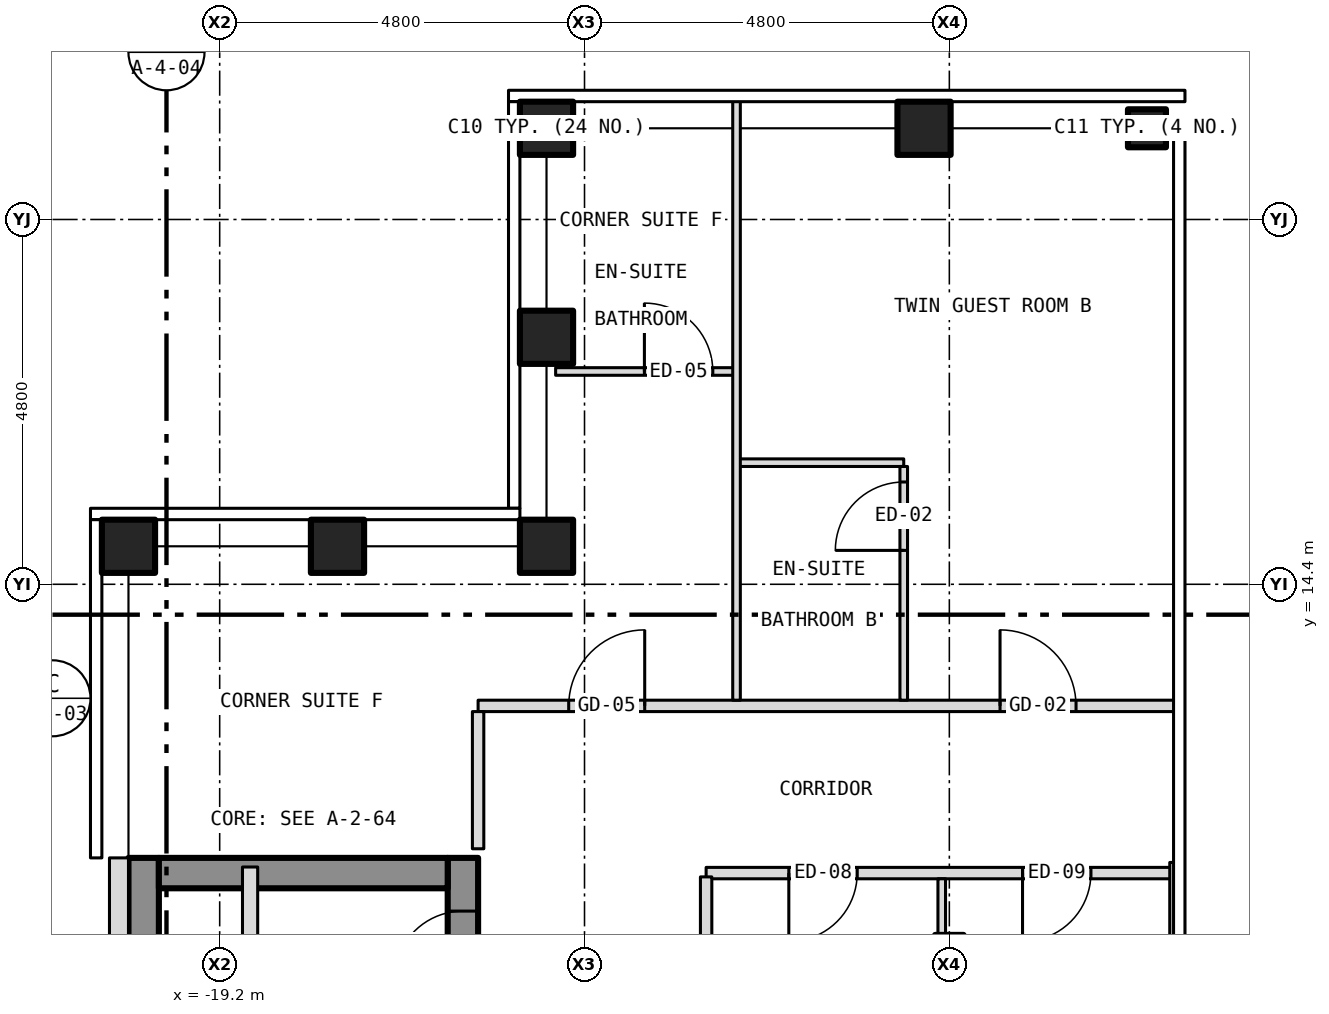
"""IFC4 building model, lengths in metres.
Left out: names, types, materials, properties, quantities, classifications, styles, units other than length and angle.
Written with IfcOpenShell. Run it as: python <this file> out.ifc"""

import sys

from ifc_helpers import new_model, si_unit, direction, frame, frame_2d, origin, origin_2d, place, context, subcontext, project, spatial, rectangle, hollow_rectangle, extrude, element, fill, save


model = new_model("IFC4")
c1 = context("Model", 3, precision=1e-05, world=origin(), true_north=direction((0.0, 1.0)))
c2 = subcontext(c1, "Body", "Model", "MODEL_VIEW")
j1 = project(units=[si_unit("LENGTHUNIT", "METRE"), si_unit("PLANEANGLEUNIT", "RADIAN")], contexts=[c1])
p1 = place(None, origin())
s1 = spatial("IfcSite", under=j1, at=p1, CompositionType="ELEMENT")
p2 = place(p1, origin())
s2 = spatial("IfcBuilding", under=s1, at=p2, CompositionType="ELEMENT")
p3 = place(p2, frame((0.0, 0.0, 233.0)))
s3 = spatial("IfcBuildingStorey", under=s2, at=p3, CompositionType="ELEMENT", Elevation=233.0)
for number, where, z_axis, x_axis in (
    (1, (-14.9, 20.4, -0.15), (0.0, 0.0, 1.0), (1.0, 0.0, 0.0)),
    (2, (-9.933, 20.4, -0.15), (0.0, 0.0, 1.0), (1.0, 0.0, 0.0)),
    (3, (-20.4, 14.9, -0.15), (0.0, 0.0, 1.0), (1.0, 0.0, 0.0)),
    (4, (-14.9, 14.9, -0.15), (0.0, 0.0, 1.0), (1.0, 0.0, 0.0)),
    (5, (-14.9, 17.65, -0.15), (0.0, 0.0, 1.0), (1.0, 0.0, 0.0)),
    (6, (-17.65, 14.9, -0.15), (0.0, 0.0, 1.0), (1.0, 0.0, 0.0)),
):
    element("IfcColumn", number, at=place(p3, frame(where, z_axis=z_axis, x_axis=x_axis)), inside=s3, PredefinedType="COLUMN", context=c2, shape_type="SweptSolid", body=[
        extrude(hollow_rectangle(XDim=0.7, YDim=0.7, WallThickness=0.04, at=origin_2d()), origin(), (0.0, 0.0, 1.0), 3.35),
    ])
p4 = place(p3, frame((-7.0, 20.4, -0.15), z_axis=(0.0, 0.0, 1.0), x_axis=(1.0, 0.0, 0.0)))
e7 = element("IfcColumn", 7, at=p4, inside=s3, PredefinedType="COLUMN", context=c2, shape_type="SweptSolid", body=[
    extrude(hollow_rectangle(XDim=0.5, YDim=0.5, WallThickness=0.03, at=origin_2d()), origin(), (0.0, 0.0, 1.0), 3.35),
])
p5 = place(p3, frame((-16.0, -10.8, 0.0), z_axis=(0.0, 0.0, 1.0), x_axis=(0.0, 1.0, 0.0)))
e8 = element("IfcWall", 8, at=p5, inside=s3, PredefinedType="SHEAR", context=c2, shape_type="SweptSolid", body=[
    extrude(rectangle(XDim=21.6, YDim=0.4, at=frame_2d((10.8, 0.0))), origin(), (0.0, 0.0, 1.0), 2.9),
])
p6 = place(p5, frame((9.4, 0.0, 0.0)))
e9 = element("IfcOpeningElement", 9, at=p6, cuts=e8, PredefinedType="OPENING", context=c2, shape_type="SweptSolid", body=[
    extrude(rectangle(XDim=1.1, YDim=2.1, at=frame_2d((0.55, 1.05))), frame((0.0, 0.212, 0.0), z_axis=(0.0, -1.0, 0.0), x_axis=(1.0, 0.0, 0.0)), (0.0, 0.0, 1.0), 0.424),
])
p7 = place(p5, frame((11.5, 0.0, 0.0)))
e10 = element("IfcOpeningElement", 10, at=p7, cuts=e8, PredefinedType="OPENING", context=c2, shape_type="SweptSolid", body=[
    extrude(rectangle(XDim=1.1, YDim=2.1, at=frame_2d((0.55, 1.05))), frame((0.0, 0.212, 0.0), z_axis=(0.0, -1.0, 0.0), x_axis=(1.0, 0.0, 0.0)), (0.0, 0.0, 1.0), 0.424),
])
p8 = place(p5, frame((13.6, 0.0, 0.0)))
e11 = element("IfcOpeningElement", 11, at=p8, cuts=e8, PredefinedType="OPENING", context=c2, shape_type="SweptSolid", body=[
    extrude(rectangle(XDim=1.1, YDim=2.1, at=frame_2d((0.55, 1.05))), frame((0.0, 0.212, 0.0), z_axis=(0.0, -1.0, 0.0), x_axis=(1.0, 0.0, 0.0)), (0.0, 0.0, 1.0), 0.424),
])
p9 = place(p5, frame((15.7, 0.0, 0.0)))
e12 = element("IfcOpeningElement", 12, at=p9, cuts=e8, PredefinedType="OPENING", context=c2, shape_type="SweptSolid", body=[
    extrude(rectangle(XDim=1.1, YDim=2.1, at=frame_2d((0.55, 1.05))), frame((0.0, 0.212, 0.0), z_axis=(0.0, -1.0, 0.0), x_axis=(1.0, 0.0, 0.0)), (0.0, 0.0, 1.0), 0.424),
])
p10 = place(p5, frame((17.8, 0.0, 0.0)))
e13 = element("IfcOpeningElement", 13, at=p10, cuts=e8, PredefinedType="OPENING", context=c2, shape_type="SweptSolid", body=[
    extrude(rectangle(XDim=1.1, YDim=2.1, at=frame_2d((0.55, 1.05))), frame((0.0, 0.212, 0.0), z_axis=(0.0, -1.0, 0.0), x_axis=(1.0, 0.0, 0.0)), (0.0, 0.0, 1.0), 0.424),
])
p11 = place(p5, frame((0.458, 0.0, 0.0)))
e14 = element("IfcOpeningElement", 14, at=p11, cuts=e8, PredefinedType="OPENING", context=c2, shape_type="SweptSolid", body=[
    extrude(rectangle(XDim=1.1, YDim=2.1, at=frame_2d((0.55, 1.05))), frame((0.0, 0.212, 0.0), z_axis=(0.0, -1.0, 0.0), x_axis=(1.0, 0.0, 0.0)), (0.0, 0.0, 1.0), 0.424),
])
p12 = place(p5, frame((7.5, 0.0, 0.0)))
e15 = element("IfcOpeningElement", 15, at=p12, cuts=e8, PredefinedType="OPENING", context=c2, shape_type="SweptSolid", body=[
    extrude(rectangle(XDim=1.1, YDim=2.1, at=frame_2d((0.55, 1.05))), frame((0.0, 0.212, 0.0), z_axis=(0.0, -1.0, 0.0), x_axis=(1.0, 0.0, 0.0)), (0.0, 0.0, 1.0), 0.424),
])
p13 = place(p5, frame((20.0, 0.0, 0.0)))
e16 = element("IfcOpeningElement", 16, at=p13, cuts=e8, PredefinedType="OPENING", context=c2, shape_type="SweptSolid", body=[
    extrude(rectangle(XDim=0.9, YDim=2.1, at=frame_2d((0.45, 1.05))), frame((0.0, 0.212, 0.0), z_axis=(0.0, -1.0, 0.0), x_axis=(1.0, 0.0, 0.0)), (0.0, 0.0, 1.0), 0.424),
])
p14 = place(p3, frame((-20.2, -10.8, 0.0), z_axis=(0.0, 0.0, 1.0), x_axis=(0.0, 1.0, 0.0)))
e17 = element("IfcWall", 17, at=p14, inside=s3, PredefinedType="SHEAR", context=c2, shape_type="SweptSolid", body=[
    extrude(rectangle(XDim=21.6, YDim=0.4, at=frame_2d((10.8, 0.0))), origin(), (0.0, 0.0, 1.0), 2.9),
])
p15 = place(p3, frame((-20.0, 10.6, 0.0), z_axis=(0.0, 0.0, 1.0), x_axis=(1.0, 0.0, 0.0)))
e18 = element("IfcWall", 18, at=p15, inside=s3, PredefinedType="SHEAR", context=c2, shape_type="SweptSolid", body=[
    extrude(rectangle(XDim=3.8, YDim=0.4, at=frame_2d((1.9, 0.0))), origin(), (0.0, 0.0, 1.0), 2.9),
])
p16 = place(p3, frame((-20.525, 10.8, 0.0), z_axis=(0.0, 0.0, 1.0), x_axis=(0.0, -1.0, 0.0)))
e19 = element("IfcWall", 19, at=p16, inside=s3, PredefinedType="SOLIDWALL", context=c2, shape_type="SweptSolid", body=[
    extrude(rectangle(XDim=21.6, YDim=0.25, at=frame_2d((10.8, 0.0))), origin(), (0.0, 0.0, 1.0), 3.5),
])
p17 = place(p16, frame((18.05, 0.0, 1.0)))
e20 = element("IfcOpeningElement", 20, at=p17, cuts=e19, PredefinedType="OPENING", context=c2, shape_type="SweptSolid", body=[
    extrude(rectangle(XDim=0.6, YDim=1.5, at=frame_2d((0.3, 0.75))), frame((0.0, 0.137, 0.0), z_axis=(0.0, -1.0, 0.0), x_axis=(1.0, 0.0, 0.0)), (0.0, 0.0, 1.0), 0.274),
])
p18 = place(p3, frame((-12.8, 10.6, 0.0), z_axis=(0.0, 0.0, 1.0), x_axis=(1.0, 0.0, 0.0)))
e21 = element("IfcWall", 21, at=p18, inside=s3, PredefinedType="PARTITIONING", context=c2, shape_type="SweptSolid", body=[
    extrude(rectangle(XDim=6.15, YDim=0.15, at=frame_2d((3.075, 0.0))), origin(), (0.0, 0.0, 1.0), 3.2),
])
p19 = place(p18, frame((1.088, 0.0, 0.0)))
e22 = element("IfcOpeningElement", 22, at=p19, cuts=e21, PredefinedType="OPENING", context=c2, shape_type="SweptSolid", body=[
    extrude(rectangle(XDim=0.9, YDim=2.1, at=frame_2d((0.45, 1.05))), frame((0.0, 0.087, 0.0), z_axis=(0.0, -1.0, 0.0), x_axis=(1.0, 0.0, 0.0)), (0.0, 0.0, 1.0), 0.174),
])
p20 = place(p18, frame((4.163, 0.0, 0.0)))
e23 = element("IfcOpeningElement", 23, at=p20, cuts=e21, PredefinedType="OPENING", context=c2, shape_type="SweptSolid", body=[
    extrude(rectangle(XDim=0.9, YDim=2.1, at=frame_2d((0.45, 1.05))), frame((0.0, 0.087, 0.0), z_axis=(0.0, -1.0, 0.0), x_axis=(1.0, 0.0, 0.0)), (0.0, 0.0, 1.0), 0.174),
])
p21 = place(p3, frame((-15.8, 12.8, 0.0), z_axis=(0.0, 0.0, 1.0), x_axis=(1.0, 0.0, 0.0)))
e24 = element("IfcWall", 24, at=p21, inside=s3, PredefinedType="PARTITIONING", context=c2, shape_type="SweptSolid", body=[
    extrude(rectangle(XDim=9.18, YDim=0.15, at=frame_2d((4.59, 0.0))), origin(), (0.0, 0.0, 1.0), 3.2),
])
p22 = place(p21, frame((6.867, 0.0, 0.0)))
e25 = element("IfcOpeningElement", 25, at=p22, cuts=e24, PredefinedType="OPENING", context=c2, shape_type="SweptSolid", body=[
    extrude(rectangle(XDim=1.0, YDim=2.1, at=frame_2d((0.5, 1.05))), frame((0.0, 0.087, 0.0), z_axis=(0.0, -1.0, 0.0), x_axis=(1.0, 0.0, 0.0)), (0.0, 0.0, 1.0), 0.174),
])
p23 = place(p21, frame((1.192, 0.0, 0.0)))
e26 = element("IfcOpeningElement", 26, at=p23, cuts=e24, PredefinedType="OPENING", context=c2, shape_type="SweptSolid", body=[
    extrude(rectangle(XDim=1.0, YDim=2.1, at=frame_2d((0.5, 1.05))), frame((0.0, 0.087, 0.0), z_axis=(0.0, -1.0, 0.0), x_axis=(1.0, 0.0, 0.0)), (0.0, 0.0, 1.0), 0.174),
])
p24 = place(p3, frame((-12.4, 16.0, 0.0), z_axis=(0.0, 0.0, 1.0), x_axis=(1.0, 0.0, 0.0)))
e27 = element("IfcWall", 27, at=p24, inside=s3, PredefinedType="PARTITIONING", context=c2, shape_type="SweptSolid", body=[
    extrude(rectangle(XDim=2.2, YDim=0.1, at=frame_2d((1.1, 0.0))), origin(), (0.0, 0.0, 1.0), 3.2),
])
p25 = place(p3, frame((-14.78, 17.2, 0.0), z_axis=(0.0, 0.0, 1.0), x_axis=(1.0, 0.0, 0.0)))
e28 = element("IfcWall", 28, at=p25, inside=s3, PredefinedType="PARTITIONING", context=c2, shape_type="SweptSolid", body=[
    extrude(rectangle(XDim=2.38, YDim=0.1, at=frame_2d((1.19, 0.0))), origin(), (0.0, 0.0, 1.0), 3.2),
])
p26 = place(p25, frame((1.168, 0.0, 0.0)))
e29 = element("IfcOpeningElement", 29, at=p26, cuts=e28, PredefinedType="OPENING", context=c2, shape_type="SweptSolid", body=[
    extrude(rectangle(XDim=0.9, YDim=2.1, at=frame_2d((0.45, 1.05))), frame((0.0, 0.062, 0.0), z_axis=(0.0, -1.0, 0.0), x_axis=(1.0, 0.0, 0.0)), (0.0, 0.0, 1.0), 0.124),
])
p27 = place(p3, frame((-18.8, -1.8, 0.0), z_axis=(0.0, 0.0, 1.0), x_axis=(0.0, 1.0, 0.0)))
e30 = element("IfcWall", 30, at=p27, inside=s3, PredefinedType="PARTITIONING", context=c2, shape_type="SweptSolid", body=[
    extrude(rectangle(XDim=12.48, YDim=0.2, at=frame_2d((6.24, 0.0))), origin(), (0.0, 0.0, 1.0), 2.9),
])
p28 = place(p3, frame((-15.8, 10.92, 0.0), z_axis=(0.0, 0.0, 1.0), x_axis=(0.0, 1.0, 0.0)))
e31 = element("IfcWall", 31, at=p28, inside=s3, PredefinedType="PARTITIONING", context=c2, shape_type="SweptSolid", body=[
    extrude(rectangle(XDim=1.805, YDim=0.15, at=frame_2d((0.903, 0.0))), origin(), (0.0, 0.0, 1.0), 3.2),
])
p29 = place(p3, frame((-12.8, 8.175, 0.0), z_axis=(0.0, 0.0, 1.0), x_axis=(0.0, 1.0, 0.0)))
e32 = element("IfcWall", 32, at=p29, inside=s3, PredefinedType="PARTITIONING", context=c2, shape_type="SweptSolid", body=[
    extrude(rectangle(XDim=2.375, YDim=0.15, at=frame_2d((1.188, 0.0))), origin(), (0.0, 0.0, 1.0), 3.2),
])
p30 = place(p3, frame((-12.4, 12.875, 0.0), z_axis=(0.0, 0.0, 1.0), x_axis=(0.0, 1.0, 0.0)))
e33 = element("IfcWall", 33, at=p30, inside=s3, PredefinedType="PARTITIONING", context=c2, shape_type="SweptSolid", body=[
    extrude(rectangle(XDim=7.905, YDim=0.1, at=frame_2d((3.953, 0.0))), origin(), (0.0, 0.0, 1.0), 3.2),
])
p31 = place(p3, frame((-10.2, 12.875, 0.0), z_axis=(0.0, 0.0, 1.0), x_axis=(0.0, 1.0, 0.0)))
e34 = element("IfcWall", 34, at=p31, inside=s3, PredefinedType="PARTITIONING", context=c2, shape_type="SweptSolid", body=[
    extrude(rectangle(XDim=3.075, YDim=0.1, at=frame_2d((1.538, 0.0))), origin(), (0.0, 0.0, 1.0), 3.2),
])
p32 = place(p31, frame((1.971, 0.0, 0.0)))
e35 = element("IfcOpeningElement", 35, at=p32, cuts=e34, PredefinedType="OPENING", context=c2, shape_type="SweptSolid", body=[
    extrude(rectangle(XDim=0.9, YDim=2.1, at=frame_2d((0.45, 1.05))), frame((0.0, 0.062, 0.0), z_axis=(0.0, -1.0, 0.0), x_axis=(1.0, 0.0, 0.0)), (0.0, 0.0, 1.0), 0.124),
])
p33 = place(p3, frame((-9.7, 9.399, 0.0), z_axis=(0.0, 0.0, 1.0), x_axis=(0.0, 1.0, 0.0)))
e36 = element("IfcWall", 36, at=p33, inside=s3, PredefinedType="PARTITIONING", context=c2, shape_type="SweptSolid", body=[
    extrude(rectangle(XDim=0.401, YDim=0.1, at=frame_2d((0.201, 0.0))), origin(), (0.0, 0.0, 1.0), 3.2),
])
p34 = place(p3, frame((-9.7, 9.8, 0.0), z_axis=(0.0, 0.0, 1.0), x_axis=(0.0, 1.0, 0.0)))
e37 = element("IfcWall", 37, at=p34, inside=s3, PredefinedType="PARTITIONING", context=c2, shape_type="SweptSolid", body=[
    extrude(rectangle(XDim=0.725, YDim=0.1, at=frame_2d((0.362, 0.0))), origin(), (0.0, 0.0, 1.0), 2.578),
])
p35 = place(p3, frame((-6.65, 7.96, 0.0), z_axis=(0.0, 0.0, 1.0), x_axis=(0.0, 1.0, 0.0)))
e38 = element("IfcWall", 38, at=p35, inside=s3, PredefinedType="PARTITIONING", context=c2, shape_type="SweptSolid", body=[
    extrude(rectangle(XDim=2.78, YDim=0.1, at=frame_2d((1.39, 0.0))), origin(), (0.0, 0.0, 1.0), 3.2),
])
p36 = place(p13, origin())
e39 = element("IfcDoor", 39, at=p36, inside=s3, OperationType="SINGLE_SWING_LEFT", PredefinedType="DOOR", context=c2, shape_type="SweptSolid", body=[
    extrude(rectangle(XDim=0.9, YDim=2.1, at=frame_2d((0.45, 1.05))), frame((0.0, 0.025, 0.0), z_axis=(0.0, -1.0, 0.0), x_axis=(1.0, 0.0, 0.0)), (0.0, 0.0, 1.0), 0.05),
])
fill(e16, e39)
p37 = place(p22, origin())
e40 = element("IfcDoor", 40, at=p37, inside=s3, OperationType="SINGLE_SWING_LEFT", PredefinedType="DOOR", context=c2, shape_type="SweptSolid", body=[
    extrude(rectangle(XDim=1.0, YDim=2.1, at=frame_2d((0.5, 1.05))), frame((0.0, 0.025, 0.0), z_axis=(0.0, -1.0, 0.0), x_axis=(1.0, 0.0, 0.0)), (0.0, 0.0, 1.0), 0.05),
])
fill(e25, e40)
p38 = place(p32, origin())
e41 = element("IfcDoor", 41, at=p38, inside=s3, OperationType="SINGLE_SWING_LEFT", PredefinedType="DOOR", context=c2, shape_type="SweptSolid", body=[
    extrude(rectangle(XDim=0.9, YDim=2.1, at=frame_2d((0.45, 1.05))), frame((0.0, 0.025, 0.0), z_axis=(0.0, -1.0, 0.0), x_axis=(1.0, 0.0, 0.0)), (0.0, 0.0, 1.0), 0.05),
])
fill(e35, e41)
p39 = place(p26, origin())
e42 = element("IfcDoor", 42, at=p39, inside=s3, OperationType="SINGLE_SWING_LEFT", PredefinedType="DOOR", context=c2, shape_type="SweptSolid", body=[
    extrude(rectangle(XDim=0.9, YDim=2.1, at=frame_2d((0.45, 1.05))), frame((0.0, 0.025, 0.0), z_axis=(0.0, -1.0, 0.0), x_axis=(1.0, 0.0, 0.0)), (0.0, 0.0, 1.0), 0.05),
])
fill(e29, e42)
p40 = place(p23, origin())
e43 = element("IfcDoor", 43, at=p40, inside=s3, OperationType="SINGLE_SWING_RIGHT", PredefinedType="DOOR", context=c2, shape_type="SweptSolid", body=[
    extrude(rectangle(XDim=1.0, YDim=2.1, at=frame_2d((0.5, 1.05))), frame((0.0, 0.025, 0.0), z_axis=(0.0, -1.0, 0.0), x_axis=(1.0, 0.0, 0.0)), (0.0, 0.0, 1.0), 0.05),
])
fill(e26, e43)
p41 = place(p19, origin())
e44 = element("IfcDoor", 44, at=p41, inside=s3, OperationType="SINGLE_SWING_LEFT", PredefinedType="DOOR", context=c2, shape_type="SweptSolid", body=[
    extrude(rectangle(XDim=0.9, YDim=2.1, at=frame_2d((0.45, 1.05))), frame((0.0, 0.025, 0.0), z_axis=(0.0, -1.0, 0.0), x_axis=(1.0, 0.0, 0.0)), (0.0, 0.0, 1.0), 0.05),
])
fill(e22, e44)
p42 = place(p20, origin())
e45 = element("IfcDoor", 45, at=p42, inside=s3, OperationType="SINGLE_SWING_LEFT", PredefinedType="DOOR", context=c2, shape_type="SweptSolid", body=[
    extrude(rectangle(XDim=0.9, YDim=2.1, at=frame_2d((0.45, 1.05))), frame((0.0, 0.025, 0.0), z_axis=(0.0, -1.0, 0.0), x_axis=(1.0, 0.0, 0.0)), (0.0, 0.0, 1.0), 0.05),
])
fill(e23, e45)
save(model, sys.argv[1])
